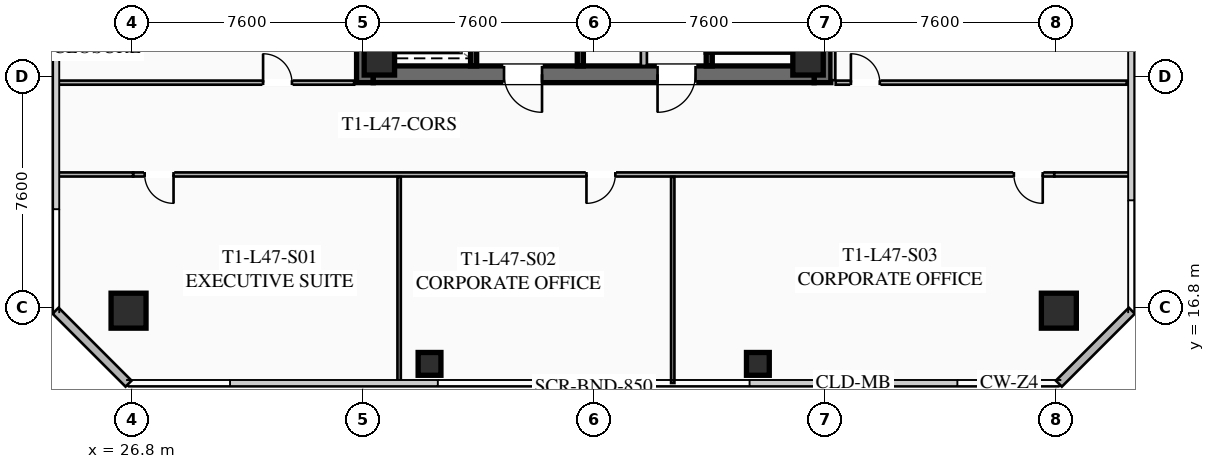
"""IFC4 building model, lengths in metres.
Left out: names, types, materials, properties, quantities, classifications, styles, units other than length and angle.
Written with IfcOpenShell. Run it as: python <this file> out.ifc"""

import sys

from ifc_helpers import new_model, si_unit, direction, frame, frame_2d, origin, origin_2d, place, context, subcontext, project, spatial, rectangle, hollow_rectangle, extrude, element, fill, save


model = new_model("IFC4")
c1 = context("Model", 3, precision=1e-05, world=origin(), true_north=direction((0.0, 1.0)))
c2 = subcontext(c1, "Body", "Model", "MODEL_VIEW")
j1 = project(units=[si_unit("LENGTHUNIT", "METRE"), si_unit("PLANEANGLEUNIT", "RADIAN")], contexts=[c1])
p1 = place(None, origin())
s1 = spatial("IfcSite", under=j1, at=p1, CompositionType="ELEMENT")
p2 = place(p1, origin())
s2 = spatial("IfcBuilding", under=s1, at=p2, CompositionType="ELEMENT")
p3 = place(p2, frame((0.0, 0.0, 174.75)))
s3 = spatial("IfcBuildingStorey", under=s2, at=p3, CompositionType="ELEMENT", Elevation=174.75)
for number, where, z_axis, x_axis in (
    (1, (34.475, 24.2, 0.0), (0.0, 0.0, 1.0), (0.0, 1.0, 0.0)),
    (2, (49.525, 39.8, 0.0), (0.0, 0.0, 1.0), (0.0, -1.0, 0.0)),
):
    element("IfcWall", number, at=place(p3, frame(where, z_axis=z_axis, x_axis=x_axis)), inside=s3, PredefinedType="SHEAR", context=c2, shape_type="SweptSolid", body=[
        extrude(rectangle(XDim=15.6, YDim=0.55, at=frame_2d((7.8, 0.0))), origin(), (0.0, 0.0, 1.0), 3.55),
    ])
p4 = place(p3, frame((49.25, 24.475, 0.0), z_axis=(0.0, 0.0, 1.0), x_axis=(-1.0, 0.0, 0.0)))
e3 = element("IfcWall", 3, at=p4, inside=s3, PredefinedType="SHEAR", context=c2, shape_type="SweptSolid", body=[
    extrude(rectangle(XDim=14.5, YDim=0.55, at=frame_2d((7.25, 0.0))), origin(), (0.0, 0.0, 1.0), 3.55),
])
p5 = place(p4, frame((8.95, 0.0, 0.0)))
e4 = element("IfcOpeningElement", 4, at=p5, cuts=e3, PredefinedType="OPENING", context=c2, shape_type="SweptSolid", body=[
    extrude(rectangle(XDim=1.25, YDim=2.25, at=frame_2d((0.625, 1.125))), frame((0.0, 0.285, 0.0), z_axis=(0.0, -1.0, 0.0), x_axis=(1.0, 0.0, 0.0)), (0.0, 0.0, 1.0), 0.57),
])
p6 = place(p4, frame((3.9, 0.0, 0.0)))
e5 = element("IfcOpeningElement", 5, at=p6, cuts=e3, PredefinedType="OPENING", context=c2, shape_type="SweptSolid", body=[
    extrude(rectangle(XDim=1.25, YDim=2.25, at=frame_2d((0.625, 1.125))), frame((0.0, 0.285, 0.0), z_axis=(0.0, -1.0, 0.0), x_axis=(1.0, 0.0, 0.0)), (0.0, 0.0, 1.0), 0.57),
])
for number, where, z_axis, x_axis in (
    (6, (34.95, 24.95, 0.0), (0.0, 0.0, 1.0), (1.0, 0.0, 0.0)),
    (7, (49.05, 24.95, 0.0), (0.0, 0.0, 1.0), (1.0, 0.0, 0.0)),
):
    element("IfcColumn", number, at=place(p3, frame(where, z_axis=z_axis, x_axis=x_axis)), inside=s3, PredefinedType="COLUMN", context=c2, shape_type="SweptSolid", body=[
        extrude(hollow_rectangle(XDim=1.0, YDim=1.0, WallThickness=0.04, at=origin_2d()), origin(), (0.0, 0.0, 1.0), 3.37),
    ])
for number, where, z_axis, x_axis in (
    (8, (26.7, 16.7, 0.0), (0.0, 0.0, 1.0), (1.0, 0.0, 0.0)),
    (9, (57.3, 16.7, 0.0), (0.0, 0.0, 1.0), (1.0, 0.0, 0.0)),
):
    element("IfcColumn", number, at=place(p3, frame(where, z_axis=z_axis, x_axis=x_axis)), inside=s3, PredefinedType="COLUMN", context=c2, shape_type="SweptSolid", body=[
        extrude(hollow_rectangle(XDim=1.15, YDim=1.15, WallThickness=0.045, at=origin_2d()), origin(), (0.0, 0.0, 1.0), 3.37),
    ])
for number, where, z_axis, x_axis in (
    (10, (36.6, 14.95, 0.0), (0.0, 0.0, 1.0), (1.0, 0.0, 0.0)),
    (11, (47.4, 14.95, 0.0), (0.0, 0.0, 1.0), (1.0, 0.0, 0.0)),
):
    element("IfcColumn", number, at=place(p3, frame(where, z_axis=z_axis, x_axis=x_axis)), inside=s3, PredefinedType="COLUMN", context=c2, shape_type="SweptSolid", body=[
        extrude(hollow_rectangle(XDim=0.75, YDim=0.75, WallThickness=0.032, at=origin_2d()), origin(), (0.0, 0.0, 1.0), 3.37),
    ])
for number, where, z_axis, x_axis in (
    (12, (26.7, 14.3, 0.0), (0.0, 0.0, 1.0), (-0.707, 0.707, 0.0)),
    (13, (59.7, 16.7, 0.0), (0.0, 0.0, 1.0), (-0.707, -0.707, 0.0)),
):
    element("IfcWall", number, at=place(p3, frame(where, z_axis=z_axis, x_axis=x_axis)), inside=s3, PredefinedType="SOLIDWALL", context=c2, shape_type="SweptSolid", body=[
        extrude(rectangle(XDim=3.394, YDim=0.28, at=frame_2d((1.697, 0.0))), origin(), (0.0, 0.0, 1.0), 3.37),
    ])
p7 = place(p3, frame((45.8, 32.8, 0.0), z_axis=(0.0, 0.0, 1.0), x_axis=(0.0, -1.0, 0.0)))
e14 = element("IfcWall", 14, at=p7, inside=s3, PredefinedType="SHEAR", context=c2, shape_type="SweptSolid", body=[
    extrude(rectangle(XDim=8.05, YDim=0.2, at=frame_2d((4.025, 0.0))), origin(), (0.0, 0.0, 1.0), 3.37),
])
p8 = place(p7, frame((0.45, 0.0, 0.0)))
e15 = element("IfcOpeningElement", 15, at=p8, cuts=e14, PredefinedType="OPENING", context=c2, shape_type="SweptSolid", body=[
    extrude(rectangle(XDim=1.15, YDim=2.2, at=frame_2d((0.575, 1.1))), frame((0.0, 0.11, 0.0), z_axis=(0.0, -1.0, 0.0), x_axis=(1.0, 0.0, 0.0)), (0.0, 0.0, 1.0), 0.22),
])
p9 = place(p3, frame((41.56, 24.75, 0.0), z_axis=(0.0, 0.0, 1.0), x_axis=(0.0, 1.0, 0.0)))
e16 = element("IfcWall", 16, at=p9, inside=s3, PredefinedType="SHEAR", context=c2, shape_type="SweptSolid", body=[
    extrude(rectangle(XDim=14.5, YDim=0.2, at=frame_2d((7.25, 0.0))), origin(), (0.0, 0.0, 1.0), 3.37),
])
p10 = place(p3, frame((38.05, 24.75, 0.0), z_axis=(0.0, 0.0, 1.0), x_axis=(0.0, 1.0, 0.0)))
e17 = element("IfcWall", 17, at=p10, inside=s3, PredefinedType="SHEAR", context=c2, shape_type="SweptSolid", body=[
    extrude(rectangle(XDim=6.45, YDim=0.2, at=frame_2d((3.225, 0.0))), origin(), (0.0, 0.0, 1.0), 3.37),
])
p11 = place(p10, frame((4.875, 0.0, 0.0)))
e18 = element("IfcOpeningElement", 18, at=p11, cuts=e17, PredefinedType="OPENING", context=c2, shape_type="SweptSolid", body=[
    extrude(rectangle(XDim=1.3, YDim=2.25, at=frame_2d((0.65, 1.125))), frame((0.0, 0.11, 0.0), z_axis=(0.0, -1.0, 0.0), x_axis=(1.0, 0.0, 0.0)), (0.0, 0.0, 1.0), 0.22),
])
p12 = place(p10, frame((2.875, 0.0, 0.0)))
e19 = element("IfcOpeningElement", 19, at=p12, cuts=e17, PredefinedType="OPENING", context=c2, shape_type="SweptSolid", body=[
    extrude(rectangle(XDim=1.3, YDim=2.25, at=frame_2d((0.65, 1.125))), frame((0.0, 0.11, 0.0), z_axis=(0.0, -1.0, 0.0), x_axis=(1.0, 0.0, 0.0)), (0.0, 0.0, 1.0), 0.22),
])
p13 = place(p10, frame((0.675, 0.0, 0.0)))
e20 = element("IfcOpeningElement", 20, at=p13, cuts=e17, PredefinedType="OPENING", context=c2, shape_type="SweptSolid", body=[
    extrude(rectangle(XDim=1.3, YDim=2.25, at=frame_2d((0.65, 1.125))), frame((0.0, 0.11, 0.0), z_axis=(0.0, -1.0, 0.0), x_axis=(1.0, 0.0, 0.0)), (0.0, 0.0, 1.0), 0.22),
])
p14 = place(p3, frame((43.65, 24.75, 0.0), z_axis=(0.0, 0.0, 1.0), x_axis=(0.0, 1.0, 0.0)))
e21 = element("IfcWall", 21, at=p14, inside=s3, PredefinedType="SOLIDWALL", context=c2, shape_type="SweptSolid", body=[
    extrude(rectangle(XDim=6.9, YDim=0.2, at=frame_2d((3.45, 0.0))), origin(), (0.0, 0.0, 1.0), 2.723),
])
p15 = place(p14, frame((0.85, 0.0, 0.0)))
e22 = element("IfcOpeningElement", 22, at=p15, cuts=e21, PredefinedType="OPENING", context=c2, shape_type="SweptSolid", body=[
    extrude(rectangle(XDim=0.95, YDim=2.05, at=frame_2d((0.475, 1.025))), frame((0.0, 0.11, 0.0), z_axis=(0.0, -1.0, 0.0), x_axis=(1.0, 0.0, 0.0)), (0.0, 0.0, 1.0), 0.22),
])
p16 = place(p14, frame((4.8, 0.0, 0.0)))
e23 = element("IfcOpeningElement", 23, at=p16, cuts=e21, PredefinedType="OPENING", context=c2, shape_type="SweptSolid", body=[
    extrude(rectangle(XDim=1.05, YDim=2.2, at=frame_2d((0.525, 1.1))), frame((0.0, 0.11, 0.0), z_axis=(0.0, -1.0, 0.0), x_axis=(1.0, 0.0, 0.0)), (0.0, 0.0, 1.0), 0.22),
])
p17 = place(p3, frame((57.15, 21.18, 0.0), z_axis=(0.0, 0.0, 1.0), x_axis=(-1.0, 0.0, 0.0)))
e24 = element("IfcWall", 24, at=p17, inside=s3, PredefinedType="PARTITIONING", context=c2, shape_type="SweptSolid", body=[
    extrude(rectangle(XDim=30.3, YDim=0.135, at=frame_2d((15.15, 0.0))), origin(), (0.0, 0.0, 1.0), 2.723),
])
p18 = place(p17, frame((28.97, 0.0, 0.0)))
e25 = element("IfcOpeningElement", 25, at=p18, cuts=e24, PredefinedType="OPENING", context=c2, shape_type="SweptSolid", body=[
    extrude(rectangle(XDim=0.95, YDim=2.05, at=frame_2d((0.475, 1.025))), frame((0.0, 0.077, 0.0), z_axis=(0.0, -1.0, 0.0), x_axis=(1.0, 0.0, 0.0)), (0.0, 0.0, 1.0), 0.155),
])
p19 = place(p17, frame((14.438, 0.0, 0.0)))
e26 = element("IfcOpeningElement", 26, at=p19, cuts=e24, PredefinedType="OPENING", context=c2, shape_type="SweptSolid", body=[
    extrude(rectangle(XDim=0.95, YDim=2.05, at=frame_2d((0.475, 1.025))), frame((0.0, 0.077, 0.0), z_axis=(0.0, -1.0, 0.0), x_axis=(1.0, 0.0, 0.0)), (0.0, 0.0, 1.0), 0.155),
])
p20 = place(p17, frame((0.38, 0.0, 0.0)))
e27 = element("IfcOpeningElement", 27, at=p20, cuts=e24, PredefinedType="OPENING", context=c2, shape_type="SweptSolid", body=[
    extrude(rectangle(XDim=0.95, YDim=2.05, at=frame_2d((0.475, 1.025))), frame((0.0, 0.077, 0.0), z_axis=(0.0, -1.0, 0.0), x_axis=(1.0, 0.0, 0.0)), (0.0, 0.0, 1.0), 0.155),
])
for number, where, z_axis, x_axis in (
    (28, (24.32, 21.18, 0.0), (0.0, 0.0, 1.0), (1.0, 0.0, 0.0)),
    (29, (57.15, 21.18, 0.0), (0.0, 0.0, 1.0), (1.0, 0.0, 0.0)),
):
    element("IfcWall", number, at=place(p3, frame(where, z_axis=z_axis, x_axis=x_axis)), inside=s3, PredefinedType="PARTITIONING", context=c2, shape_type="SweptSolid", body=[
        extrude(rectangle(XDim=2.53, YDim=0.135, at=frame_2d((1.265, 0.0))), origin(), (0.0, 0.0, 1.0), 2.723),
    ])
for number, where, z_axis, x_axis in (
    (30, (35.6, 14.32, 0.0), (0.0, 0.0, 1.0), (0.0, 1.0, 0.0)),
    (31, (44.6, 14.32, 0.0), (0.0, 0.0, 1.0), (0.0, 1.0, 0.0)),
):
    element("IfcWall", number, at=place(p3, frame(where, z_axis=z_axis, x_axis=x_axis)), inside=s3, PredefinedType="PARTITIONING", context=c2, shape_type="SweptSolid", body=[
        extrude(rectangle(XDim=6.78, YDim=0.11, at=frame_2d((3.39, 0.0))), origin(), (0.0, 0.0, 1.0), 2.723),
    ])
p21 = place(p3, frame((49.88, 39.72, 0.0), z_axis=(0.0, 0.0, 1.0), x_axis=(0.0, -1.0, 0.0)))
e32 = element("IfcWall", 32, at=p21, inside=s3, PredefinedType="PARTITIONING", context=c2, shape_type="SweptSolid", body=[
    extrude(rectangle(XDim=15.44, YDim=0.135, at=frame_2d((7.72, 0.0))), origin(), (0.0, 0.0, 1.0), 2.723),
])
p22 = place(p3, frame((49.96, 24.2, 0.0), z_axis=(0.0, 0.0, 1.0), x_axis=(1.0, 0.0, 0.0)))
e33 = element("IfcWall", 33, at=p22, inside=s3, PredefinedType="PARTITIONING", context=c2, shape_type="SweptSolid", body=[
    extrude(rectangle(XDim=9.57, YDim=0.135, at=frame_2d((4.785, 0.0))), origin(), (0.0, 0.0, 1.0), 2.723),
])
p23 = place(p22, frame((0.5, 0.0, 0.0)))
e34 = element("IfcOpeningElement", 34, at=p23, cuts=e33, PredefinedType="OPENING", context=c2, shape_type="SweptSolid", body=[
    extrude(rectangle(XDim=0.95, YDim=2.05, at=frame_2d((0.475, 1.025))), frame((0.0, 0.077, 0.0), z_axis=(0.0, -1.0, 0.0), x_axis=(1.0, 0.0, 0.0)), (0.0, 0.0, 1.0), 0.155),
])
p24 = place(p3, frame((24.32, 24.2, 0.0), z_axis=(0.0, 0.0, 1.0), x_axis=(1.0, 0.0, 0.0)))
e35 = element("IfcWall", 35, at=p24, inside=s3, PredefinedType="PARTITIONING", context=c2, shape_type="SweptSolid", body=[
    extrude(rectangle(XDim=9.8, YDim=0.135, at=frame_2d((4.9, 0.0))), origin(), (0.0, 0.0, 1.0), 2.723),
])
p25 = place(p24, frame((6.805, 0.0, 0.0)))
e36 = element("IfcOpeningElement", 36, at=p25, cuts=e35, PredefinedType="OPENING", context=c2, shape_type="SweptSolid", body=[
    extrude(rectangle(XDim=0.95, YDim=2.05, at=frame_2d((0.475, 1.025))), frame((0.0, 0.077, 0.0), z_axis=(0.0, -1.0, 0.0), x_axis=(1.0, 0.0, 0.0)), (0.0, 0.0, 1.0), 0.155),
])
p26 = place(p5, origin())
e37 = element("IfcDoor", 37, at=p26, inside=s3, OperationType="SINGLE_SWING_LEFT", PredefinedType="DOOR", context=c2, shape_type="SweptSolid", body=[
    extrude(rectangle(XDim=1.25, YDim=2.25, at=frame_2d((0.625, 1.125))), frame((0.0, 0.025, 0.0), z_axis=(0.0, -1.0, 0.0), x_axis=(1.0, 0.0, 0.0)), (0.0, 0.0, 1.0), 0.05),
])
fill(e4, e37)
p27 = place(p6, origin())
e38 = element("IfcDoor", 38, at=p27, inside=s3, OperationType="SINGLE_SWING_RIGHT", PredefinedType="DOOR", context=c2, shape_type="SweptSolid", body=[
    extrude(rectangle(XDim=1.25, YDim=2.25, at=frame_2d((0.625, 1.125))), frame((0.0, 0.025, 0.0), z_axis=(0.0, -1.0, 0.0), x_axis=(1.0, 0.0, 0.0)), (0.0, 0.0, 1.0), 0.05),
])
fill(e5, e38)
p28 = place(p18, origin())
e39 = element("IfcDoor", 39, at=p28, inside=s3, OperationType="SINGLE_SWING_LEFT", PredefinedType="DOOR", context=c2, shape_type="SweptSolid", body=[
    extrude(rectangle(XDim=0.95, YDim=2.05, at=frame_2d((0.475, 1.025))), frame((0.0, 0.025, 0.0), z_axis=(0.0, -1.0, 0.0), x_axis=(1.0, 0.0, 0.0)), (0.0, 0.0, 1.0), 0.05),
])
fill(e25, e39)
p29 = place(p19, origin())
e40 = element("IfcDoor", 40, at=p29, inside=s3, OperationType="SINGLE_SWING_RIGHT", PredefinedType="DOOR", context=c2, shape_type="SweptSolid", body=[
    extrude(rectangle(XDim=0.95, YDim=2.05, at=frame_2d((0.475, 1.025))), frame((0.0, 0.025, 0.0), z_axis=(0.0, -1.0, 0.0), x_axis=(1.0, 0.0, 0.0)), (0.0, 0.0, 1.0), 0.05),
])
fill(e26, e40)
p30 = place(p20, origin())
e41 = element("IfcDoor", 41, at=p30, inside=s3, OperationType="SINGLE_SWING_LEFT", PredefinedType="DOOR", context=c2, shape_type="SweptSolid", body=[
    extrude(rectangle(XDim=0.95, YDim=2.05, at=frame_2d((0.475, 1.025))), frame((0.0, 0.025, 0.0), z_axis=(0.0, -1.0, 0.0), x_axis=(1.0, 0.0, 0.0)), (0.0, 0.0, 1.0), 0.05),
])
fill(e27, e41)
p31 = place(p23, origin())
e42 = element("IfcDoor", 42, at=p31, inside=s3, OperationType="SINGLE_SWING_LEFT", PredefinedType="DOOR", context=c2, shape_type="SweptSolid", body=[
    extrude(rectangle(XDim=0.95, YDim=2.05, at=frame_2d((0.475, 1.025))), frame((0.0, 0.025, 0.0), z_axis=(0.0, -1.0, 0.0), x_axis=(1.0, 0.0, 0.0)), (0.0, 0.0, 1.0), 0.05),
])
fill(e34, e42)
p32 = place(p25, origin())
e43 = element("IfcDoor", 43, at=p32, inside=s3, OperationType="SINGLE_SWING_LEFT", PredefinedType="DOOR", context=c2, shape_type="SweptSolid", body=[
    extrude(rectangle(XDim=0.95, YDim=2.05, at=frame_2d((0.475, 1.025))), frame((0.0, 0.025, 0.0), z_axis=(0.0, -1.0, 0.0), x_axis=(1.0, 0.0, 0.0)), (0.0, 0.0, 1.0), 0.05),
])
fill(e36, e43)
save(model, sys.argv[1])
